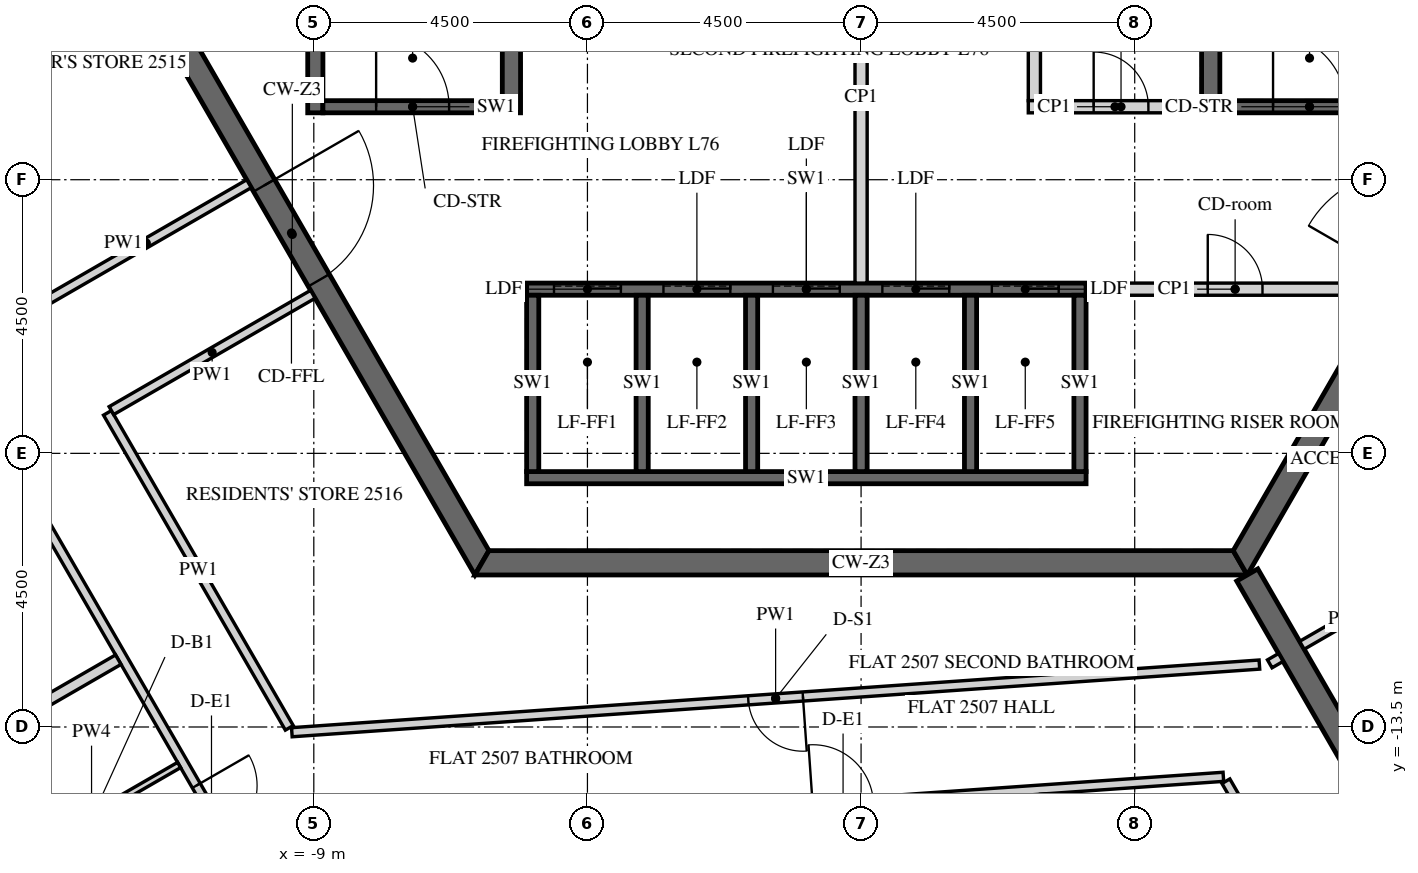
"""IFC4 building model, lengths in metres.
Left out: names, types, materials, properties, quantities, classifications, styles, units other than length and angle.
Written with IfcOpenShell. Run it as: python <this file> out.ifc"""

import sys

from ifc_helpers import new_model, si_unit, direction, frame, frame_2d, origin, place, context, subcontext, project, spatial, polyline, rectangle, outline, extrude, element, fill, save


model = new_model("IFC4")
c1 = context("Model", 3, precision=1e-05, world=origin(), true_north=direction((0.0, 1.0)))
c2 = subcontext(c1, "Body", "Model", "MODEL_VIEW")
j1 = project(units=[si_unit("LENGTHUNIT", "METRE"), si_unit("PLANEANGLEUNIT", "RADIAN")], contexts=[c1])
p1 = place(None, origin())
s1 = spatial("IfcSite", under=j1, at=p1, CompositionType="ELEMENT")
p2 = place(p1, origin())
s2 = spatial("IfcBuilding", under=s1, at=p2, CompositionType="ELEMENT")
p3 = place(p2, frame((0.0, 0.0, 314.7)))
s3 = spatial("IfcBuildingStorey", under=s2, at=p3, CompositionType="ELEMENT", Elevation=314.7)
p4 = place(p3, frame((-12.471, 0.0, -0.15), z_axis=(0.0, 0.0, 1.0), x_axis=(0.499996419489, -0.866027470984, 0.0)))
e1 = element("IfcWall", 1, at=p4, inside=s3, PredefinedType="SHEAR", context=c2, shape_type="SweptSolid", body=[
    extrude(outline(polyline([(-0.115, -0.2), (12.586, -0.2), (12.355, 0.2), (0.115, 0.2), (-0.115, -0.2)])), origin(), (0.0, 0.0, 1.0), 3.9),
])
p5 = place(p4, frame((5.306, 0.0, 0.15)))
e2 = element("IfcOpeningElement", 2, at=p5, cuts=e1, PredefinedType="OPENING", context=c2, shape_type="SweptSolid", body=[
    extrude(rectangle(XDim=1.8, YDim=2.4, at=frame_2d((0.9, 1.2))), frame((0.0, 0.21, 0.0), z_axis=(0.0, -1.0, 0.0), x_axis=(1.0, 0.0, 0.0)), (0.0, 0.0, 1.0), 0.42),
])
p6 = place(p3, frame((-6.235, -10.8, -0.15), z_axis=(0.0, 0.0, 1.0), x_axis=(1.0, 0.0, 0.0)))
e3 = element("IfcWall", 3, at=p6, inside=s3, PredefinedType="SHEAR", context=c2, shape_type="SweptSolid", body=[
    extrude(outline(polyline([(-0.115, -0.2), (12.586, -0.2), (12.355, 0.2), (0.115, 0.2), (-0.115, -0.2)])), origin(), (0.0, 0.0, 1.0), 3.9),
])
p7 = place(p3, frame((6.235, -10.8, -0.15), z_axis=(0.0, 0.0, 1.0), x_axis=(0.499996419489, 0.866027470984, 0.0)))
e4 = element("IfcWall", 4, at=p7, inside=s3, PredefinedType="SHEAR", context=c2, shape_type="SweptSolid", body=[
    extrude(outline(polyline([(-0.115, -0.2), (12.586, -0.2), (12.355, 0.2), (0.115, 0.2), (-0.115, -0.2)])), origin(), (0.0, 0.0, 1.0), 3.9),
])
p8 = place(p7, frame((5.364, 0.0, 0.15)))
e5 = element("IfcOpeningElement", 5, at=p8, cuts=e4, PredefinedType="OPENING", context=c2, shape_type="SweptSolid", body=[
    extrude(rectangle(XDim=1.8, YDim=2.4, at=frame_2d((0.9, 1.2))), frame((0.0, 0.21, 0.0), z_axis=(0.0, -1.0, 0.0), x_axis=(1.0, 0.0, 0.0)), (0.0, 0.0, 1.0), 0.42),
])
p9 = place(p3, frame((6.351, -11.0, -0.15), z_axis=(0.0, 0.0, 1.0), x_axis=(0.499998894578, -0.866026041999, 0.0)))
e6 = element("IfcWall", 6, at=p9, inside=s3, PredefinedType="SHEAR", context=c2, shape_type="SweptSolid", body=[
    extrude(rectangle(XDim=15.544, YDim=0.4, at=frame_2d((7.772, 0.0))), origin(), (0.0, 0.0, 1.0), 3.9),
])
p10 = place(p9, frame((6.872, 0.0, 0.15)))
e7 = element("IfcOpeningElement", 7, at=p10, cuts=e6, PredefinedType="OPENING", context=c2, shape_type="SweptSolid", body=[
    extrude(rectangle(XDim=1.8, YDim=2.4, at=frame_2d((0.9, 1.2))), frame((0.0, 0.21, 0.0), z_axis=(0.0, -1.0, 0.0), x_axis=(1.0, 0.0, 0.0)), (0.0, 0.0, 1.0), 0.42),
])
p11 = place(p3, frame((-5.5, -6.3, -0.25), z_axis=(0.0, 0.0, 1.0), x_axis=(1.0, 0.0, 0.0)))
e8 = element("IfcWall", 8, at=p11, inside=s3, PredefinedType="SHEAR", context=c2, shape_type="SweptSolid", body=[
    extrude(rectangle(XDim=9.2, YDim=0.2, at=frame_2d((4.6, 0.0))), origin(), (0.0, 0.0, 1.0), 3.9),
])
p12 = place(p11, frame((0.45, 0.0, 0.25)))
e9 = element("IfcOpeningElement", 9, at=p12, cuts=e8, PredefinedType="OPENING", context=c2, shape_type="SweptSolid", body=[
    extrude(rectangle(XDim=1.1, YDim=2.1, at=frame_2d((0.55, 1.05))), frame((0.0, 0.11, 0.0), z_axis=(0.0, -1.0, 0.0), x_axis=(1.0, 0.0, 0.0)), (0.0, 0.0, 1.0), 0.22),
])
p13 = place(p11, frame((2.25, 0.0, 0.25)))
e10 = element("IfcOpeningElement", 10, at=p13, cuts=e8, PredefinedType="OPENING", context=c2, shape_type="SweptSolid", body=[
    extrude(rectangle(XDim=1.1, YDim=2.1, at=frame_2d((0.55, 1.05))), frame((0.0, 0.11, 0.0), z_axis=(0.0, -1.0, 0.0), x_axis=(1.0, 0.0, 0.0)), (0.0, 0.0, 1.0), 0.22),
])
p14 = place(p11, frame((4.05, 0.0, 0.25)))
e11 = element("IfcOpeningElement", 11, at=p14, cuts=e8, PredefinedType="OPENING", context=c2, shape_type="SweptSolid", body=[
    extrude(rectangle(XDim=1.1, YDim=2.1, at=frame_2d((0.55, 1.05))), frame((0.0, 0.11, 0.0), z_axis=(0.0, -1.0, 0.0), x_axis=(1.0, 0.0, 0.0)), (0.0, 0.0, 1.0), 0.22),
])
p15 = place(p11, frame((5.85, 0.0, 0.25)))
e12 = element("IfcOpeningElement", 12, at=p15, cuts=e8, PredefinedType="OPENING", context=c2, shape_type="SweptSolid", body=[
    extrude(rectangle(XDim=1.1, YDim=2.1, at=frame_2d((0.55, 1.05))), frame((0.0, 0.11, 0.0), z_axis=(0.0, -1.0, 0.0), x_axis=(1.0, 0.0, 0.0)), (0.0, 0.0, 1.0), 0.22),
])
p16 = place(p11, frame((7.65, 0.0, 0.25)))
e13 = element("IfcOpeningElement", 13, at=p16, cuts=e8, PredefinedType="OPENING", context=c2, shape_type="SweptSolid", body=[
    extrude(rectangle(XDim=1.1, YDim=2.1, at=frame_2d((0.55, 1.05))), frame((0.0, 0.11, 0.0), z_axis=(0.0, -1.0, 0.0), x_axis=(1.0, 0.0, 0.0)), (0.0, 0.0, 1.0), 0.22),
])
p17 = place(p3, frame((-5.5, -9.4, -0.25), z_axis=(0.0, 0.0, 1.0), x_axis=(1.0, 0.0, 0.0)))
e14 = element("IfcWall", 14, at=p17, inside=s3, PredefinedType="SHEAR", context=c2, shape_type="SweptSolid", body=[
    extrude(rectangle(XDim=9.2, YDim=0.2, at=frame_2d((4.6, 0.0))), origin(), (0.0, 0.0, 1.0), 3.9),
])
for number, where, z_axis, x_axis in (
    (15, (-5.4, -9.3, -0.25), (0.0, 0.0, 1.0), (0.0, 1.0, 0.0)),
    (16, (-3.6, -9.3, -0.25), (0.0, 0.0, 1.0), (0.0, 1.0, 0.0)),
    (17, (-1.8, -9.3, -0.25), (0.0, 0.0, 1.0), (0.0, 1.0, 0.0)),
    (18, (0.0, -9.3, -0.25), (0.0, 0.0, 1.0), (0.0, 1.0, 0.0)),
    (19, (1.8, -9.3, -0.25), (0.0, 0.0, 1.0), (0.0, 1.0, 0.0)),
    (20, (3.6, -9.3, -0.25), (0.0, 0.0, 1.0), (0.0, 1.0, 0.0)),
):
    element("IfcWall", number, at=place(p3, frame(where, z_axis=z_axis, x_axis=x_axis)), inside=s3, PredefinedType="SHEAR", context=c2, shape_type="SweptSolid", body=[
        extrude(rectangle(XDim=2.9, YDim=0.2, at=frame_2d((1.45, 0.0))), origin(), (0.0, 0.0, 1.0), 3.9),
    ])
p18 = place(p3, frame((2.75, -3.3, 0.0), z_axis=(0.0, 0.0, 1.0), x_axis=(1.0, 0.0, 0.0)))
e21 = element("IfcWall", 21, at=p18, inside=s3, PredefinedType="PARTITIONING", context=c2, shape_type="SweptSolid", body=[
    extrude(rectangle(XDim=2.85, YDim=0.2, at=frame_2d((1.425, 0.0))), origin(), (0.0, 0.0, 1.0), 3.65),
])
p19 = place(p18, frame((1.075, 0.0, 0.0)))
e22 = element("IfcOpeningElement", 22, at=p19, cuts=e21, PredefinedType="OPENING", context=c2, shape_type="SweptSolid", body=[
    extrude(rectangle(XDim=0.9, YDim=2.1, at=frame_2d((0.45, 1.05))), frame((0.0, 0.11, 0.0), z_axis=(0.0, -1.0, 0.0), x_axis=(1.0, 0.0, 0.0)), (0.0, 0.0, 1.0), 0.22),
])
p20 = place(p3, frame((2.85, -3.2, 0.0), z_axis=(0.0, 0.0, 1.0), x_axis=(0.0, 1.0, 0.0)))
e23 = element("IfcWall", 23, at=p20, inside=s3, PredefinedType="PARTITIONING", context=c2, shape_type="SweptSolid", body=[
    extrude(rectangle(XDim=3.1, YDim=0.2, at=frame_2d((1.55, 0.0))), origin(), (0.0, 0.0, 1.0), 3.65),
])
p21 = place(p3, frame((0.0, -6.2, 0.0), z_axis=(0.0, 0.0, 1.0), x_axis=(0.0, 1.0, 0.0)))
e24 = element("IfcWall", 24, at=p21, inside=s3, PredefinedType="PARTITIONING", context=c2, shape_type="SweptSolid", body=[
    extrude(rectangle(XDim=6.1, YDim=0.2, at=frame_2d((3.05, 0.0))), origin(), (0.0, 0.0, 1.0), 3.65),
])
p22 = place(p3, frame((3.7, -6.3, 0.0), z_axis=(0.0, 0.0, 1.0), x_axis=(1.0, 0.0, 0.0)))
e25 = element("IfcWall", 25, at=p22, inside=s3, PredefinedType="PARTITIONING", context=c2, shape_type="SweptSolid", body=[
    extrude(rectangle(XDim=4.903, YDim=0.2, at=frame_2d((2.451, 0.0))), origin(), (0.0, 0.0, 1.0), 3.65),
])
p23 = place(p22, frame((2.001, 0.0, 0.0)))
e26 = element("IfcOpeningElement", 26, at=p23, cuts=e25, PredefinedType="OPENING", context=c2, shape_type="SweptSolid", body=[
    extrude(rectangle(XDim=0.9, YDim=2.1, at=frame_2d((0.45, 1.05))), frame((0.0, 0.11, 0.0), z_axis=(0.0, -1.0, 0.0), x_axis=(1.0, 0.0, 0.0)), (0.0, 0.0, 1.0), 0.22),
])
p24 = place(p3, frame((5.75, -3.4, -0.25), z_axis=(0.0, 0.0, 1.0), x_axis=(0.0, 1.0, 0.0)))
e27 = element("IfcWall", 27, at=p24, inside=s3, PredefinedType="SHEAR", context=c2, shape_type="SweptSolid", body=[
    extrude(rectangle(XDim=6.8, YDim=0.3, at=frame_2d((3.4, 0.0))), origin(), (0.0, 0.0, 1.0), 3.9),
])
p25 = place(p3, frame((5.9, -3.3, -0.25), z_axis=(0.0, 0.0, 1.0), x_axis=(1.0, 0.0, 0.0)))
e28 = element("IfcWall", 28, at=p25, inside=s3, PredefinedType="SHEAR", context=c2, shape_type="SweptSolid", body=[
    extrude(rectangle(XDim=2.95, YDim=0.2, at=frame_2d((1.475, 0.0))), origin(), (0.0, 0.0, 1.0), 3.9),
])
p26 = place(p25, frame((0.875, 0.0, 0.25)))
e29 = element("IfcOpeningElement", 29, at=p26, cuts=e28, PredefinedType="OPENING", context=c2, shape_type="SweptSolid", body=[
    extrude(rectangle(XDim=1.2, YDim=2.4, at=frame_2d((0.6, 1.2))), frame((0.0, 0.11, 0.0), z_axis=(0.0, -1.0, 0.0), x_axis=(1.0, 0.0, 0.0)), (0.0, 0.0, 1.0), 0.22),
])
p27 = place(p3, frame((-5.75, -3.4, -0.25), z_axis=(0.0, 0.0, 1.0), x_axis=(0.0, 1.0, 0.0)))
e30 = element("IfcWall", 30, at=p27, inside=s3, PredefinedType="SHEAR", context=c2, shape_type="SweptSolid", body=[
    extrude(rectangle(XDim=6.8, YDim=0.3, at=frame_2d((3.4, 0.0))), origin(), (0.0, 0.0, 1.0), 3.9),
])
p28 = place(p3, frame((-8.975, -3.4, -0.25), z_axis=(0.0, 0.0, 1.0), x_axis=(0.0, 1.0, 0.0)))
e31 = element("IfcWall", 31, at=p28, inside=s3, PredefinedType="SHEAR", context=c2, shape_type="SweptSolid", body=[
    extrude(rectangle(XDim=6.8, YDim=0.25, at=frame_2d((3.4, 0.0))), origin(), (0.0, 0.0, 1.0), 3.9),
])
p29 = place(p3, frame((-8.85, -3.3, -0.25), z_axis=(0.0, 0.0, 1.0), x_axis=(1.0, 0.0, 0.0)))
e32 = element("IfcWall", 32, at=p29, inside=s3, PredefinedType="SHEAR", context=c2, shape_type="SweptSolid", body=[
    extrude(rectangle(XDim=2.95, YDim=0.2, at=frame_2d((1.475, 0.0))), origin(), (0.0, 0.0, 1.0), 3.9),
])
p30 = place(p29, frame((0.875, 0.0, 0.25)))
e33 = element("IfcOpeningElement", 33, at=p30, cuts=e32, PredefinedType="OPENING", context=c2, shape_type="SweptSolid", body=[
    extrude(rectangle(XDim=1.2, YDim=2.4, at=frame_2d((0.6, 1.2))), frame((0.0, 0.11, 0.0), z_axis=(0.0, -1.0, 0.0), x_axis=(1.0, 0.0, 0.0)), (0.0, 0.0, 1.0), 0.22),
])
p31 = place(p3, frame((-17.659, -2.814, 0.0), z_axis=(0.0, 0.0, 1.0), x_axis=(0.499992611149, -0.866029669697, 0.0)))
e34 = element("IfcWall", 34, at=p31, inside=s3, PredefinedType="PARTITIONING", context=c2, shape_type="SweptSolid", body=[
    extrude(rectangle(XDim=14.602, YDim=0.15, at=frame_2d((7.301, 0.0))), origin(), (0.0, 0.0, 1.0), 2.988),
])
p32 = place(p31, frame((2.925, 0.0, 0.0)))
e35 = element("IfcOpeningElement", 35, at=p32, cuts=e34, PredefinedType="OPENING", context=c2, shape_type="SweptSolid", body=[
    extrude(rectangle(XDim=1.0, YDim=2.1, at=frame_2d((0.5, 1.05))), frame((0.0, 0.085, 0.0), z_axis=(0.0, -1.0, 0.0), x_axis=(1.0, 0.0, 0.0)), (0.0, 0.0, 1.0), 0.17),
])
p33 = place(p31, frame((13.452, 0.0, 0.0)))
e36 = element("IfcOpeningElement", 36, at=p33, cuts=e34, PredefinedType="OPENING", context=c2, shape_type="SweptSolid", body=[
    extrude(rectangle(XDim=1.0, YDim=2.1, at=frame_2d((0.5, 1.05))), frame((0.0, 0.085, 0.0), z_axis=(0.0, -1.0, 0.0), x_axis=(1.0, 0.0, 0.0)), (0.0, 0.0, 1.0), 0.17),
])
p34 = place(p3, frame((-10.274, -15.454, 0.0), z_axis=(0.0, 0.0, 1.0), x_axis=(0.997564284069, 0.069753130035, 0.0)))
e37 = element("IfcWall", 37, at=p34, inside=s3, PredefinedType="PARTITIONING", context=c2, shape_type="SweptSolid", body=[
    extrude(rectangle(XDim=16.272, YDim=0.15, at=frame_2d((8.136, 0.0))), origin(), (0.0, 0.0, 1.0), 2.988),
])
p35 = place(p34, frame((9.503, 0.0, 0.0)))
e38 = element("IfcOpeningElement", 38, at=p35, cuts=e37, PredefinedType="OPENING", context=c2, shape_type="SweptSolid", body=[
    extrude(rectangle(XDim=1.0, YDim=2.1, at=frame_2d((0.5, 1.05))), frame((0.0, 0.085, 0.0), z_axis=(0.0, -1.0, 0.0), x_axis=(1.0, 0.0, 0.0)), (0.0, 0.0, 1.0), 0.17),
])
p36 = place(p3, frame((6.0, -14.392, 0.0), z_axis=(0.0, 0.0, 1.0), x_axis=(0.499999400414, -0.866025749955, 0.0)))
e39 = element("IfcWall", 39, at=p36, inside=s3, PredefinedType="PARTITIONING", context=c2, shape_type="SweptSolid", body=[
    extrude(rectangle(XDim=7.911, YDim=0.15, at=frame_2d((3.955, 0.0))), origin(), (0.0, 0.0, 1.0), 2.988),
])
p37 = place(p3, frame((-10.066, -4.566, 0.0), z_axis=(0.0, 0.0, 1.0), x_axis=(-0.866027128446, -0.499997012787, 0.0)))
e40 = element("IfcWall", 40, at=p37, inside=s3, PredefinedType="PARTITIONING", context=c2, shape_type="SweptSolid", body=[
    extrude(rectangle(XDim=3.9, YDim=0.15, at=frame_2d((1.95, 0.0))), origin(), (0.0, 0.0, 1.0), 2.988),
])
p38 = place(p3, frame((6.903, -12.356, 0.0), z_axis=(0.0, 0.0, 1.0), x_axis=(-0.866088799389, -0.499890179513, 0.0)))
e41 = element("IfcWall", 41, at=p38, inside=s3, PredefinedType="PARTITIONING", context=c2, shape_type="SweptSolid", body=[
    extrude(rectangle(XDim=0.21, YDim=0.15, at=frame_2d((0.105, 0.0))), origin(), (0.0, 0.0, 1.0), 2.988),
])
p39 = place(p3, frame((6.551, -12.473, 0.0), z_axis=(0.0, 0.0, 1.0), x_axis=(-0.997563421853, -0.069765459797, 0.0)))
e42 = element("IfcWall", 42, at=p39, inside=s3, PredefinedType="PARTITIONING", context=c2, shape_type="SweptSolid", body=[
    extrude(rectangle(XDim=15.95, YDim=0.15, at=frame_2d((7.975, 0.0))), origin(), (0.0, 0.0, 1.0), 2.988),
])
p40 = place(p39, frame((7.525, 0.0, 0.0)))
e43 = element("IfcOpeningElement", 43, at=p40, cuts=e42, PredefinedType="OPENING", context=c2, shape_type="SweptSolid", body=[
    extrude(rectangle(XDim=0.9, YDim=2.1, at=frame_2d((0.45, 1.05))), frame((0.0, 0.085, 0.0), z_axis=(0.0, -1.0, 0.0), x_axis=(1.0, 0.0, 0.0)), (0.0, 0.0, 1.0), 0.17),
])
p41 = place(p3, frame((-9.403, -13.514, 0.0), z_axis=(0.0, 0.0, 1.0), x_axis=(-0.499998061752, 0.866026522829, 0.0)))
e44 = element("IfcWall", 44, at=p41, inside=s3, PredefinedType="PARTITIONING", context=c2, shape_type="SweptSolid", body=[
    extrude(rectangle(XDim=5.981, YDim=0.15, at=frame_2d((2.99, 0.0))), origin(), (0.0, 0.0, 1.0), 2.988),
])
p42 = place(p3, frame((-12.328, -8.297, 0.0), z_axis=(0.0, 0.0, 1.0), x_axis=(0.866027222339, 0.499996850159, 0.0)))
e45 = element("IfcWall", 45, at=p42, inside=s3, PredefinedType="PARTITIONING", context=c2, shape_type="SweptSolid", body=[
    extrude(rectangle(XDim=3.825, YDim=0.15, at=frame_2d((1.913, 0.0))), origin(), (0.0, 0.0, 1.0), 2.988),
])
p43 = place(p3, frame((8.743, -11.294, 0.0), z_axis=(0.0, 0.0, 1.0), x_axis=(-0.866013532718, -0.500020560727, 0.0)))
e46 = element("IfcWall", 46, at=p43, inside=s3, PredefinedType="PARTITIONING", context=c2, shape_type="SweptSolid", body=[
    extrude(rectangle(XDim=1.725, YDim=0.15, at=frame_2d((0.863, 0.0))), origin(), (0.0, 0.0, 1.0), 2.988),
])
p44 = place(p3, frame((-19.771, -16.755, 0.0), z_axis=(0.0, 0.0, 1.0), x_axis=(0.866025292695, 0.500000192413, 0.0)))
e47 = element("IfcWall", 47, at=p44, inside=s3, PredefinedType="PARTITIONING", context=c2, shape_type="SweptSolid", body=[
    extrude(rectangle(XDim=8.725, YDim=0.18, at=frame_2d((4.363, 0.0))), origin(), (0.0, 0.0, 1.0), 2.988),
])
p45 = place(p3, frame((-11.215, -14.125, 0.0), z_axis=(0.0, 0.0, 1.0), x_axis=(-0.866020521143, -0.500008456887, 0.0)))
e48 = element("IfcWall", 48, at=p45, inside=s3, PredefinedType="PARTITIONING", context=c2, shape_type="SweptSolid", body=[
    extrude(rectangle(XDim=3.325, YDim=0.1, at=frame_2d((1.663, 0.0))), origin(), (0.0, 0.0, 1.0), 2.988),
])
p46 = place(p45, frame((1.225, 0.0, 0.0)))
e49 = element("IfcOpeningElement", 49, at=p46, cuts=e48, PredefinedType="OPENING", context=c2, shape_type="SweptSolid", body=[
    extrude(rectangle(XDim=0.8, YDim=2.1, at=frame_2d((0.4, 1.05))), frame((0.0, 0.06, 0.0), z_axis=(0.0, -1.0, 0.0), x_axis=(1.0, 0.0, 0.0)), (0.0, 0.0, 1.0), 0.12),
])
p47 = place(p5, origin())
e50 = element("IfcDoor", 50, at=p47, inside=s3, OperationType="DOUBLE_DOOR_SINGLE_SWING", PredefinedType="DOOR", context=c2, shape_type="SweptSolid", body=[
    extrude(rectangle(XDim=1.8, YDim=2.4, at=frame_2d((0.9, 1.2))), frame((0.0, 0.025, 0.0), z_axis=(0.0, -1.0, 0.0), x_axis=(1.0, 0.0, 0.0)), (0.0, 0.0, 1.0), 0.05),
])
fill(e2, e50)
p48 = place(p19, origin())
e51 = element("IfcDoor", 51, at=p48, inside=s3, OperationType="SINGLE_SWING_LEFT", PredefinedType="DOOR", context=c2, shape_type="SweptSolid", body=[
    extrude(rectangle(XDim=0.9, YDim=2.1, at=frame_2d((0.45, 1.05))), frame((0.0, 0.025, 0.0), z_axis=(0.0, -1.0, 0.0), x_axis=(1.0, 0.0, 0.0)), (0.0, 0.0, 1.0), 0.05),
])
fill(e22, e51)
p49 = place(p23, origin())
e52 = element("IfcDoor", 52, at=p49, inside=s3, OperationType="SINGLE_SWING_LEFT", PredefinedType="DOOR", context=c2, shape_type="SweptSolid", body=[
    extrude(rectangle(XDim=0.9, YDim=2.1, at=frame_2d((0.45, 1.05))), frame((0.0, 0.025, 0.0), z_axis=(0.0, -1.0, 0.0), x_axis=(1.0, 0.0, 0.0)), (0.0, 0.0, 1.0), 0.05),
])
fill(e26, e52)
p50 = place(p26, origin())
e53 = element("IfcDoor", 53, at=p50, inside=s3, OperationType="SINGLE_SWING_LEFT", PredefinedType="DOOR", context=c2, shape_type="SweptSolid", body=[
    extrude(rectangle(XDim=1.2, YDim=2.4, at=frame_2d((0.6, 1.2))), frame((0.0, 0.025, 0.0), z_axis=(0.0, -1.0, 0.0), x_axis=(1.0, 0.0, 0.0)), (0.0, 0.0, 1.0), 0.05),
])
fill(e29, e53)
p51 = place(p30, origin())
e54 = element("IfcDoor", 54, at=p51, inside=s3, OperationType="SINGLE_SWING_LEFT", PredefinedType="DOOR", context=c2, shape_type="SweptSolid", body=[
    extrude(rectangle(XDim=1.2, YDim=2.4, at=frame_2d((0.6, 1.2))), frame((0.0, 0.025, 0.0), z_axis=(0.0, -1.0, 0.0), x_axis=(1.0, 0.0, 0.0)), (0.0, 0.0, 1.0), 0.05),
])
fill(e33, e54)
p52 = place(p12, origin())
e55 = element("IfcDoor", 55, at=p52, inside=s3, OperationType="SLIDING_TO_LEFT", PredefinedType="DOOR", context=c2, shape_type="SweptSolid", body=[
    extrude(rectangle(XDim=1.1, YDim=2.1, at=frame_2d((0.55, 1.05))), frame((0.0, 0.025, 0.0), z_axis=(0.0, -1.0, 0.0), x_axis=(1.0, 0.0, 0.0)), (0.0, 0.0, 1.0), 0.05),
])
fill(e9, e55)
p53 = place(p13, origin())
e56 = element("IfcDoor", 56, at=p53, inside=s3, OperationType="SLIDING_TO_LEFT", PredefinedType="DOOR", context=c2, shape_type="SweptSolid", body=[
    extrude(rectangle(XDim=1.1, YDim=2.1, at=frame_2d((0.55, 1.05))), frame((0.0, 0.025, 0.0), z_axis=(0.0, -1.0, 0.0), x_axis=(1.0, 0.0, 0.0)), (0.0, 0.0, 1.0), 0.05),
])
fill(e10, e56)
p54 = place(p14, origin())
e57 = element("IfcDoor", 57, at=p54, inside=s3, OperationType="SLIDING_TO_LEFT", PredefinedType="DOOR", context=c2, shape_type="SweptSolid", body=[
    extrude(rectangle(XDim=1.1, YDim=2.1, at=frame_2d((0.55, 1.05))), frame((0.0, 0.025, 0.0), z_axis=(0.0, -1.0, 0.0), x_axis=(1.0, 0.0, 0.0)), (0.0, 0.0, 1.0), 0.05),
])
fill(e11, e57)
p55 = place(p15, origin())
e58 = element("IfcDoor", 58, at=p55, inside=s3, OperationType="SLIDING_TO_LEFT", PredefinedType="DOOR", context=c2, shape_type="SweptSolid", body=[
    extrude(rectangle(XDim=1.1, YDim=2.1, at=frame_2d((0.55, 1.05))), frame((0.0, 0.025, 0.0), z_axis=(0.0, -1.0, 0.0), x_axis=(1.0, 0.0, 0.0)), (0.0, 0.0, 1.0), 0.05),
])
fill(e12, e58)
p56 = place(p16, origin())
e59 = element("IfcDoor", 59, at=p56, inside=s3, OperationType="SLIDING_TO_LEFT", PredefinedType="DOOR", context=c2, shape_type="SweptSolid", body=[
    extrude(rectangle(XDim=1.1, YDim=2.1, at=frame_2d((0.55, 1.05))), frame((0.0, 0.025, 0.0), z_axis=(0.0, -1.0, 0.0), x_axis=(1.0, 0.0, 0.0)), (0.0, 0.0, 1.0), 0.05),
])
fill(e13, e59)
p57 = place(p33, origin())
e60 = element("IfcDoor", 60, at=p57, inside=s3, OperationType="SINGLE_SWING_LEFT", PredefinedType="DOOR", context=c2, shape_type="SweptSolid", body=[
    extrude(rectangle(XDim=1.0, YDim=2.1, at=frame_2d((0.5, 1.05))), frame((0.0, 0.025, 0.0), z_axis=(0.0, -1.0, 0.0), x_axis=(1.0, 0.0, 0.0)), (0.0, 0.0, 1.0), 0.05),
])
fill(e36, e60)
p58 = place(p40, origin())
e61 = element("IfcDoor", 61, at=p58, inside=s3, OperationType="SINGLE_SWING_RIGHT", PredefinedType="DOOR", context=c2, shape_type="SweptSolid", body=[
    extrude(rectangle(XDim=0.9, YDim=2.1, at=frame_2d((0.45, 1.05))), frame((0.0, 0.025, 0.0), z_axis=(0.0, -1.0, 0.0), x_axis=(1.0, 0.0, 0.0)), (0.0, 0.0, 1.0), 0.05),
])
fill(e43, e61)
save(model, sys.argv[1])
